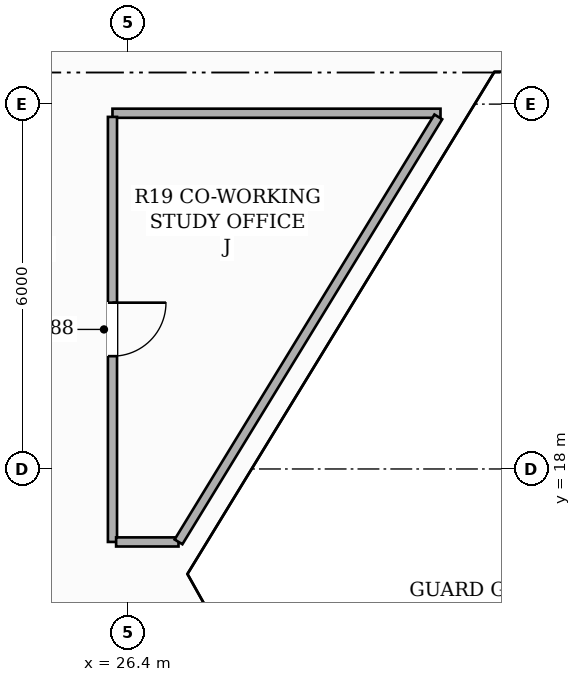
"""IFC4 building model, lengths in metres.
Left out: names, types, materials, properties, quantities, classifications, styles, units other than length and angle.
Written with IfcOpenShell. Run it as: python <this file> out.ifc"""

import sys

from ifc_helpers import new_model, si_unit, direction, frame, frame_2d, origin, place, context, subcontext, project, spatial, rectangle, extrude, element, fill, save


model = new_model("IFC4")
c1 = context("Model", 3, precision=1e-05, world=origin(), true_north=direction((0.0, 1.0)))
c2 = subcontext(c1, "Body", "Model", "MODEL_VIEW")
j1 = project(units=[si_unit("LENGTHUNIT", "METRE"), si_unit("PLANEANGLEUNIT", "RADIAN")], contexts=[c1])
p1 = place(None, origin())
s1 = spatial("IfcSite", under=j1, at=p1, CompositionType="ELEMENT")
p2 = place(p1, origin())
s2 = spatial("IfcBuilding", under=s1, at=p2, CompositionType="ELEMENT")
p3 = place(p2, frame((0.0, 0.0, 40.1)))
s3 = spatial("IfcBuildingStorey", under=s2, at=p3, CompositionType="ELEMENT", Elevation=40.1)
p4 = place(p3, frame((31.545, 23.85, 0.0), z_axis=(0.0, 0.0, 1.0), x_axis=(-1.0, 0.0, 0.0)))
e1 = element("IfcWall", 1, at=p4, inside=s3, PredefinedType="PARTITIONING", context=c2, shape_type="SweptSolid", body=[
    extrude(rectangle(XDim=5.395, YDim=0.15, at=frame_2d((2.698, 0.0))), origin(), (0.0, 0.0, 1.0), 2.669),
])
p5 = place(p3, frame((26.15, 23.79, 0.0), z_axis=(0.0, 0.0, 1.0), x_axis=(0.0, -1.0, 0.0)))
e2 = element("IfcWall", 2, at=p5, inside=s3, PredefinedType="PARTITIONING", context=c2, shape_type="SweptSolid", body=[
    extrude(rectangle(XDim=6.99, YDim=0.15, at=frame_2d((3.495, 0.0))), origin(), (0.0, 0.0, 1.0), 2.669),
])
p6 = place(p5, frame((3.055, 0.0, 0.0)))
e3 = element("IfcOpeningElement", 3, at=p6, cuts=e2, PredefinedType="OPENING", context=c2, shape_type="SweptSolid", body=[
    extrude(rectangle(XDim=0.88, YDim=2.1, at=frame_2d((0.44, 1.05))), frame((0.0, 0.085, 0.0), z_axis=(0.0, -1.0, 0.0), x_axis=(1.0, 0.0, 0.0)), (0.0, 0.0, 1.0), 0.17),
])
p7 = place(p3, frame((26.21, 16.8, 0.0), z_axis=(0.0, 0.0, 1.0), x_axis=(1.0, 0.0, 0.0)))
e4 = element("IfcWall", 4, at=p7, inside=s3, PredefinedType="PARTITIONING", context=c2, shape_type="SweptSolid", body=[
    extrude(rectangle(XDim=1.026, YDim=0.15, at=frame_2d((0.513, 0.0))), origin(), (0.0, 0.0, 1.0), 3.06),
])
p8 = place(p3, frame((27.236, 16.801, 0.0), z_axis=(0.0, 0.0, 1.0), x_axis=(0.521617567684, 0.853179414358, 0.0)))
e5 = element("IfcWall", 5, at=p8, inside=s3, PredefinedType="PARTITIONING", context=c2, shape_type="SweptSolid", body=[
    extrude(rectangle(XDim=8.192, YDim=0.15, at=frame_2d((4.096, 0.0))), origin(), (0.0, 0.0, 1.0), 2.669),
])
p9 = place(p6, origin())
e6 = element("IfcDoor", 6, at=p9, inside=s3, OperationType="SINGLE_SWING_LEFT", PredefinedType="DOOR", context=c2, shape_type="SweptSolid", body=[
    extrude(rectangle(XDim=0.88, YDim=2.1, at=frame_2d((0.44, 1.05))), frame((0.0, 0.025, 0.0), z_axis=(0.0, -1.0, 0.0), x_axis=(1.0, 0.0, 0.0)), (0.0, 0.0, 1.0), 0.05),
])
fill(e3, e6)
save(model, sys.argv[1])
